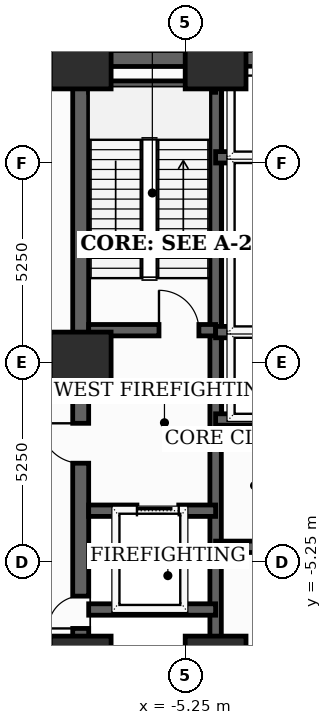
"""IFC4 building model, lengths in metres.
Left out: names, types, materials, properties, quantities, classifications, styles, units other than length and angle.
Written with IfcOpenShell. Run it as: python <this file> out.ifc"""

import sys

from ifc_helpers import new_model, si_unit, direction, frame, frame_2d, origin, origin_2d, place, context, subcontext, project, spatial, rectangle, extrude, element, fill, save


model = new_model("IFC4")
c1 = context("Model", 3, precision=1e-05, world=origin(), true_north=direction((0.0, 1.0)))
c2 = subcontext(c1, "Body", "Model", "MODEL_VIEW")
j1 = project(units=[si_unit("LENGTHUNIT", "METRE"), si_unit("PLANEANGLEUNIT", "RADIAN")], contexts=[c1])
p1 = place(None, origin())
s1 = spatial("IfcSite", under=j1, at=p1, CompositionType="ELEMENT")
p2 = place(p1, origin())
s2 = spatial("IfcBuilding", under=s1, at=p2, CompositionType="ELEMENT")
p3 = place(p2, frame((0.0, 0.0, 10.4)))
s3 = spatial("IfcBuildingStorey", under=s2, at=p3, CompositionType="ELEMENT", Elevation=10.4)
for number, where, z_axis, x_axis in (
    (1, (-8.0, -8.0, 0.0), (0.0, 0.0, 1.0), (1.0, 0.0, 0.0)),
    (2, (-4.45, -8.0, 0.0), (0.0, 0.0, 1.0), (1.0, 0.0, 0.0)),
    (3, (-4.45, 8.0, 0.0), (0.0, 0.0, 1.0), (1.0, 0.0, 0.0)),
    (4, (-8.0, 8.0, 0.0), (0.0, 0.0, 1.0), (1.0, 0.0, 0.0)),
    (5, (-8.0, 0.0, 0.0), (0.0, 0.0, 1.0), (1.0, 0.0, 0.0)),
):
    element("IfcColumn", number, at=place(p3, frame(where, z_axis=z_axis, x_axis=x_axis)), inside=s3, PredefinedType="COLUMN", context=c2, shape_type="SweptSolid", body=[
        extrude(rectangle(XDim=1.6, YDim=1.6, at=origin_2d()), origin(), (0.0, 0.0, 1.0), 5.2),
    ])
p4 = place(p3, frame((-8.0, -8.0, 0.0), z_axis=(0.0, 0.0, 1.0), x_axis=(0.0, 1.0, 0.0)))
e6 = element("IfcWall", 6, at=p4, inside=s3, PredefinedType="SHEAR", context=c2, shape_type="SweptSolid", body=[
    extrude(rectangle(XDim=16.0, YDim=0.42, at=frame_2d((8.0, 0.0))), origin(), (0.0, 0.0, 1.0), 4.95),
])
p5 = place(p4, frame((1.002, 0.0, 0.0)))
e7 = element("IfcOpeningElement", 7, at=p5, cuts=e6, PredefinedType="OPENING", context=c2, shape_type="SweptSolid", body=[
    extrude(rectangle(XDim=0.85, YDim=2.02, at=frame_2d((0.425, 1.01))), frame((0.0, 0.22, 0.0), z_axis=(0.0, -1.0, 0.0), x_axis=(1.0, 0.0, 0.0)), (0.0, 0.0, 1.0), 0.44),
])
p6 = place(p4, frame((5.35, 0.0, 0.0)))
e8 = element("IfcOpeningElement", 8, at=p6, cuts=e6, PredefinedType="OPENING", context=c2, shape_type="SweptSolid", body=[
    extrude(rectangle(XDim=1.05, YDim=2.15, at=frame_2d((0.525, 1.075))), frame((0.0, 0.22, 0.0), z_axis=(0.0, -1.0, 0.0), x_axis=(1.0, 0.0, 0.0)), (0.0, 0.0, 1.0), 0.44),
])
p7 = place(p3, frame((-8.0, 8.0, 0.0), z_axis=(0.0, 0.0, 1.0), x_axis=(1.0, 0.0, 0.0)))
e9 = element("IfcWall", 9, at=p7, inside=s3, PredefinedType="SHEAR", context=c2, shape_type="SweptSolid", body=[
    extrude(rectangle(XDim=16.0, YDim=0.42, at=frame_2d((8.0, 0.0))), origin(), (0.0, 0.0, 1.0), 4.95),
])
p8 = place(p7, frame((7.1, 0.0, 0.0)))
e10 = element("IfcOpeningElement", 10, at=p8, cuts=e9, PredefinedType="OPENING", context=c2, shape_type="SweptSolid", body=[
    extrude(rectangle(XDim=1.8, YDim=2.15, at=frame_2d((0.9, 1.075))), frame((0.0, 0.22, 0.0), z_axis=(0.0, -1.0, 0.0), x_axis=(1.0, 0.0, 0.0)), (0.0, 0.0, 1.0), 0.44),
])
p9 = place(p3, frame((-4.45, -7.79, 0.0), z_axis=(0.0, 0.0, 1.0), x_axis=(0.0, 1.0, 0.0)))
e11 = element("IfcWall", 11, at=p9, inside=s3, PredefinedType="SHEAR", context=c2, shape_type="SweptSolid", body=[
    extrude(rectangle(XDim=15.58, YDim=0.3, at=frame_2d((7.79, 0.0))), origin(), (0.0, 0.0, 1.0), 4.95),
])
p10 = place(p3, frame((-7.79, 0.85, 0.0), z_axis=(0.0, 0.0, 1.0), x_axis=(1.0, 0.0, 0.0)))
e12 = element("IfcWall", 12, at=p10, inside=s3, PredefinedType="SHEAR", context=c2, shape_type="SweptSolid", body=[
    extrude(rectangle(XDim=3.34, YDim=0.3, at=frame_2d((1.67, 0.0))), origin(), (0.0, 0.0, 1.0), 4.95),
])
p11 = place(p10, frame((1.85, 0.0, 0.0)))
e13 = element("IfcOpeningElement", 13, at=p11, cuts=e12, PredefinedType="OPENING", context=c2, shape_type="SweptSolid", body=[
    extrude(rectangle(XDim=1.05, YDim=2.15, at=frame_2d((0.525, 1.075))), frame((0.0, 0.16, 0.0), z_axis=(0.0, -1.0, 0.0), x_axis=(1.0, 0.0, 0.0)), (0.0, 0.0, 1.0), 0.32),
])
p12 = place(p3, frame((-7.79, 7.26, 0.0), z_axis=(0.0, 0.0, 1.0), x_axis=(1.0, 0.0, 0.0)))
e14 = element("IfcWall", 14, at=p12, inside=s3, PredefinedType="SHEAR", context=c2, shape_type="SweptSolid", body=[
    extrude(rectangle(XDim=3.34, YDim=0.3, at=frame_2d((1.67, 0.0))), origin(), (0.0, 0.0, 1.0), 4.95),
])
p13 = place(p3, frame((-7.79, -3.9, 0.0), z_axis=(0.0, 0.0, 1.0), x_axis=(1.0, 0.0, 0.0)))
e15 = element("IfcWall", 15, at=p13, inside=s3, PredefinedType="SHEAR", context=c2, shape_type="SweptSolid", body=[
    extrude(rectangle(XDim=3.34, YDim=0.3, at=frame_2d((1.67, 0.0))), origin(), (0.0, 0.0, 1.0), 4.95),
])
p14 = place(p13, frame((1.27, 0.0, 0.0)))
e16 = element("IfcOpeningElement", 16, at=p14, cuts=e15, PredefinedType="OPENING", context=c2, shape_type="SweptSolid", body=[
    extrude(rectangle(XDim=1.1, YDim=2.1, at=frame_2d((0.55, 1.05))), frame((0.0, 0.16, 0.0), z_axis=(0.0, -1.0, 0.0), x_axis=(1.0, 0.0, 0.0)), (0.0, 0.0, 1.0), 0.32),
])
p15 = place(p3, frame((-7.79, -6.5, 0.0), z_axis=(0.0, 0.0, 1.0), x_axis=(1.0, 0.0, 0.0)))
e17 = element("IfcWall", 17, at=p15, inside=s3, PredefinedType="SHEAR", context=c2, shape_type="SweptSolid", body=[
    extrude(rectangle(XDim=3.34, YDim=0.3, at=frame_2d((1.67, 0.0))), origin(), (0.0, 0.0, 1.0), 4.95),
])
p16 = place(p3, frame((-4.45, -4.85, 0.0), z_axis=(0.0, 0.0, 1.0), x_axis=(1.0, 0.0, 0.0)))
e18 = element("IfcWall", 18, at=p16, inside=s3, PredefinedType="SHEAR", context=c2, shape_type="SweptSolid", body=[
    extrude(rectangle(XDim=8.9, YDim=0.3, at=frame_2d((4.45, 0.0))), origin(), (0.0, 0.0, 1.0), 4.95),
])
for number, where, z_axis, x_axis in (
    (19, (-4.45, -1.5, 0.0), (0.0, 0.0, 1.0), (1.0, 0.0, 0.0)),
    (20, (-4.45, 0.8, 0.0), (0.0, 0.0, 1.0), (1.0, 0.0, 0.0)),
    (21, (-4.45, 3.1, 0.0), (0.0, 0.0, 1.0), (1.0, 0.0, 0.0)),
    (22, (-4.45, 5.4, 0.0), (0.0, 0.0, 1.0), (1.0, 0.0, 0.0)),
):
    element("IfcWall", number, at=place(p3, frame(where, z_axis=z_axis, x_axis=x_axis)), inside=s3, PredefinedType="SHEAR", context=c2, shape_type="SweptSolid", body=[
        extrude(rectangle(XDim=2.77, YDim=0.3, at=frame_2d((1.385, 0.0))), origin(), (0.0, 0.0, 1.0), 4.95),
    ])
p17 = place(p5, origin())
e23 = element("IfcDoor", 23, at=p17, inside=s3, OperationType="SINGLE_SWING_LEFT", PredefinedType="TRAPDOOR", context=c2, shape_type="SweptSolid", body=[
    extrude(rectangle(XDim=0.85, YDim=2.02, at=frame_2d((0.425, 1.01))), frame((0.0, 0.025, 0.0), z_axis=(0.0, -1.0, 0.0), x_axis=(1.0, 0.0, 0.0)), (0.0, 0.0, 1.0), 0.05),
])
fill(e7, e23)
p18 = place(p6, origin())
e24 = element("IfcDoor", 24, at=p18, inside=s3, OperationType="SINGLE_SWING_RIGHT", PredefinedType="DOOR", context=c2, shape_type="SweptSolid", body=[
    extrude(rectangle(XDim=1.05, YDim=2.15, at=frame_2d((0.525, 1.075))), frame((0.0, 0.025, 0.0), z_axis=(0.0, -1.0, 0.0), x_axis=(1.0, 0.0, 0.0)), (0.0, 0.0, 1.0), 0.05),
])
fill(e8, e24)
p19 = place(p11, origin())
e25 = element("IfcDoor", 25, at=p19, inside=s3, OperationType="SINGLE_SWING_LEFT", PredefinedType="DOOR", context=c2, shape_type="SweptSolid", body=[
    extrude(rectangle(XDim=1.05, YDim=2.15, at=frame_2d((0.525, 1.075))), frame((0.0, 0.025, 0.0), z_axis=(0.0, -1.0, 0.0), x_axis=(1.0, 0.0, 0.0)), (0.0, 0.0, 1.0), 0.05),
])
fill(e13, e25)
p20 = place(p14, origin())
e26 = element("IfcDoor", 26, at=p20, inside=s3, OperationType="SLIDING_TO_LEFT", PredefinedType="DOOR", context=c2, shape_type="SweptSolid", body=[
    extrude(rectangle(XDim=1.1, YDim=2.1, at=frame_2d((0.55, 1.05))), frame((0.0, 0.025, 0.0), z_axis=(0.0, -1.0, 0.0), x_axis=(1.0, 0.0, 0.0)), (0.0, 0.0, 1.0), 0.05),
])
fill(e16, e26)
save(model, sys.argv[1])
